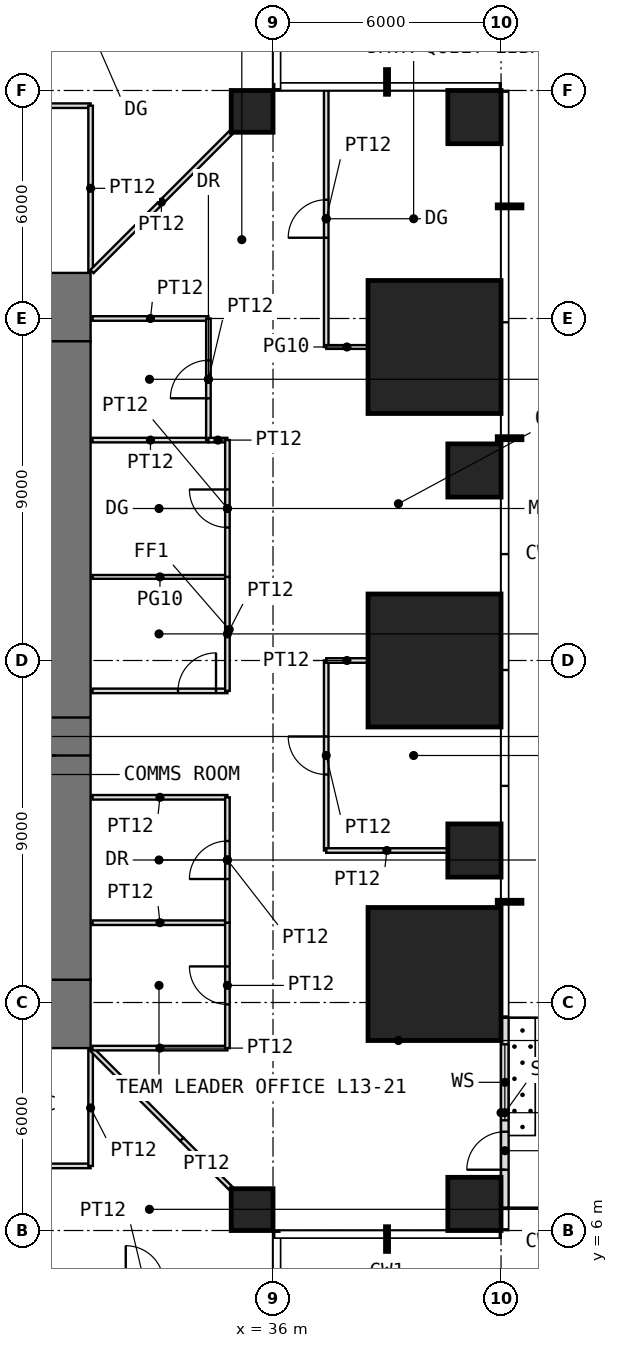
"""IFC4 building model, lengths in metres.
Left out: names, types, materials, properties, quantities, classifications, styles, units other than length and angle.
Written with IfcOpenShell. Run it as: python <this file> out.ifc"""

import sys

from ifc_helpers import new_model, si_unit, direction, frame, frame_2d, origin, origin_2d, place, context, subcontext, project, spatial, rectangle, extrude, element, fill, save


model = new_model("IFC4")
c1 = context("Model", 3, precision=1e-05, world=origin(), true_north=direction((0.0, 1.0)))
c2 = subcontext(c1, "Body", "Model", "MODEL_VIEW")
j1 = project(units=[si_unit("LENGTHUNIT", "METRE"), si_unit("PLANEANGLEUNIT", "RADIAN")], contexts=[c1])
p1 = place(None, origin())
s1 = spatial("IfcSite", under=j1, at=p1, CompositionType="ELEMENT")
p2 = place(p1, origin())
s2 = spatial("IfcBuilding", under=s1, at=p2, CompositionType="ELEMENT")
p3 = place(p2, frame((0.0, 0.0, 58.5)))
s3 = spatial("IfcBuildingStorey", under=s2, at=p3, CompositionType="ELEMENT", Elevation=58.5)
p4 = place(p3, frame((35.45, 6.55, 0.0), z_axis=(0.0, 0.0, 1.0), x_axis=(1.0, 0.0, 0.0)))
e1 = element("IfcColumn", 1, at=p4, inside=s3, PredefinedType="COLUMN", context=c2, shape_type="SweptSolid", body=[
    extrude(rectangle(XDim=1.1, YDim=1.1, at=origin_2d()), origin(), (0.0, 0.0, 1.0), 4.0),
])
p5 = place(p3, frame((41.3, 6.7, 0.0), z_axis=(0.0, 0.0, 1.0), x_axis=(1.0, 0.0, 0.0)))
e2 = element("IfcColumn", 2, at=p5, inside=s3, PredefinedType="COLUMN", context=c2, shape_type="SweptSolid", body=[
    extrude(rectangle(XDim=1.4, YDim=1.4, at=origin_2d()), origin(), (0.0, 0.0, 1.0), 4.0),
])
p6 = place(p3, frame((40.25, 12.75, 0.0), z_axis=(0.0, 0.0, 1.0), x_axis=(1.0, 0.0, 0.0)))
e3 = element("IfcColumn", 3, at=p6, inside=s3, PredefinedType="COLUMN", context=c2, shape_type="SweptSolid", body=[
    extrude(rectangle(XDim=3.5, YDim=3.5, at=origin_2d()), origin(), (0.0, 0.0, 1.0), 4.0),
])
p7 = place(p3, frame((41.3, 16.0, 0.0), z_axis=(0.0, 0.0, 1.0), x_axis=(1.0, 0.0, 0.0)))
e4 = element("IfcColumn", 4, at=p7, inside=s3, PredefinedType="COLUMN", context=c2, shape_type="SweptSolid", body=[
    extrude(rectangle(XDim=1.4, YDim=1.4, at=origin_2d()), origin(), (0.0, 0.0, 1.0), 4.0),
])
p8 = place(p3, frame((40.25, 21.0, 0.0), z_axis=(0.0, 0.0, 1.0), x_axis=(1.0, 0.0, 0.0)))
e5 = element("IfcColumn", 5, at=p8, inside=s3, PredefinedType="COLUMN", context=c2, shape_type="SweptSolid", body=[
    extrude(rectangle(XDim=3.5, YDim=3.5, at=origin_2d()), origin(), (0.0, 0.0, 1.0), 4.0),
])
p9 = place(p3, frame((41.3, 26.0, 0.0), z_axis=(0.0, 0.0, 1.0), x_axis=(1.0, 0.0, 0.0)))
e6 = element("IfcColumn", 6, at=p9, inside=s3, PredefinedType="COLUMN", context=c2, shape_type="SweptSolid", body=[
    extrude(rectangle(XDim=1.4, YDim=1.4, at=origin_2d()), origin(), (0.0, 0.0, 1.0), 4.0),
])
p10 = place(p3, frame((40.25, 29.25, 0.0), z_axis=(0.0, 0.0, 1.0), x_axis=(1.0, 0.0, 0.0)))
e7 = element("IfcColumn", 7, at=p10, inside=s3, PredefinedType="COLUMN", context=c2, shape_type="SweptSolid", body=[
    extrude(rectangle(XDim=3.5, YDim=3.5, at=origin_2d()), origin(), (0.0, 0.0, 1.0), 4.0),
])
p11 = place(p3, frame((35.45, 35.45, 0.0), z_axis=(0.0, 0.0, 1.0), x_axis=(1.0, 0.0, 0.0)))
e8 = element("IfcColumn", 8, at=p11, inside=s3, PredefinedType="COLUMN", context=c2, shape_type="SweptSolid", body=[
    extrude(rectangle(XDim=1.1, YDim=1.1, at=origin_2d()), origin(), (0.0, 0.0, 1.0), 4.0),
])
p12 = place(p3, frame((41.3, 35.3, 0.0), z_axis=(0.0, 0.0, 1.0), x_axis=(1.0, 0.0, 0.0)))
e9 = element("IfcColumn", 9, at=p12, inside=s3, PredefinedType="COLUMN", context=c2, shape_type="SweptSolid", body=[
    extrude(rectangle(XDim=1.4, YDim=1.4, at=origin_2d()), origin(), (0.0, 0.0, 1.0), 4.0),
])
p13 = place(p3, frame((42.1, 6.6, 0.0), z_axis=(0.0, 0.0, 1.0), x_axis=(0.0, 1.0, 0.0)))
e10 = element("IfcWall", 10, at=p13, inside=s3, PredefinedType="USERDEFINED", context=c2, shape_type="SweptSolid", body=[
    extrude(rectangle(XDim=5.0, YDim=0.2, at=frame_2d((2.5, 0.0))), origin(), (0.0, 0.0, 1.0), 3.75),
])
p14 = place(p13, frame((1.0, 0.0, 0.0)))
e11 = element("IfcOpeningElement", 11, at=p14, cuts=e10, PredefinedType="OPENING", context=c2, shape_type="SweptSolid", body=[
    extrude(rectangle(XDim=1.0, YDim=2.4, at=frame_2d((0.5, 1.2))), frame((0.0, 0.11, 0.0), z_axis=(0.0, -1.0, 0.0), x_axis=(1.0, 0.0, 0.0)), (0.0, 0.0, 1.0), 0.22),
])
p15 = place(p13, frame((2.3, 0.0, 0.3)))
e12 = element("IfcOpeningElement", 12, at=p15, cuts=e10, PredefinedType="OPENING", context=c2, shape_type="SweptSolid", body=[
    extrude(rectangle(XDim=2.0, YDim=2.7, at=frame_2d((1.0, 1.35))), frame((0.0, 0.11, 0.0), z_axis=(0.0, -1.0, 0.0), x_axis=(1.0, 0.0, 0.0)), (0.0, 0.0, 1.0), 0.22),
])
p16 = place(p3, frame((10.8, 11.7, -0.05), z_axis=(0.0, 0.0, 1.0), x_axis=(1.0, 0.0, 0.0)))
e13 = element("IfcWall", 13, at=p16, inside=s3, PredefinedType="SHEAR", context=c2, shape_type="SweptSolid", body=[
    extrude(rectangle(XDim=20.4, YDim=1.8, at=frame_2d((10.2, 0.0))), origin(), (0.0, 0.0, 1.0), 4.0),
])
p17 = place(p16, frame((9.2, 0.0, 0.05)))
e14 = element("IfcOpeningElement", 14, at=p17, cuts=e13, PredefinedType="OPENING", context=c2, shape_type="SweptSolid", body=[
    extrude(rectangle(XDim=2.0, YDim=2.2, at=frame_2d((1.0, 1.1))), frame((0.0, 0.91, 0.0), z_axis=(0.0, -1.0, 0.0), x_axis=(1.0, 0.0, 0.0)), (0.0, 0.0, 1.0), 1.82),
])
p18 = place(p3, frame((10.8, 30.3, -0.05), z_axis=(0.0, 0.0, 1.0), x_axis=(1.0, 0.0, 0.0)))
e15 = element("IfcWall", 15, at=p18, inside=s3, PredefinedType="SHEAR", context=c2, shape_type="SweptSolid", body=[
    extrude(rectangle(XDim=20.4, YDim=1.8, at=frame_2d((10.2, 0.0))), origin(), (0.0, 0.0, 1.0), 4.0),
])
p19 = place(p18, frame((9.2, 0.0, 0.05)))
e16 = element("IfcOpeningElement", 16, at=p19, cuts=e15, PredefinedType="OPENING", context=c2, shape_type="SweptSolid", body=[
    extrude(rectangle(XDim=2.0, YDim=2.2, at=frame_2d((1.0, 1.1))), frame((0.0, 0.91, 0.0), z_axis=(0.0, -1.0, 0.0), x_axis=(1.0, 0.0, 0.0)), (0.0, 0.0, 1.0), 1.82),
])
p20 = place(p3, frame((30.3, 12.6, -0.05), z_axis=(0.0, 0.0, 1.0), x_axis=(0.0, 1.0, 0.0)))
e17 = element("IfcWall", 17, at=p20, inside=s3, PredefinedType="SHEAR", context=c2, shape_type="SweptSolid", body=[
    extrude(rectangle(XDim=16.8, YDim=1.8, at=frame_2d((8.4, 0.0))), origin(), (0.0, 0.0, 1.0), 4.0),
])
p21 = place(p20, frame((5.9, 0.0, 0.05)))
e18 = element("IfcOpeningElement", 18, at=p21, cuts=e17, PredefinedType="OPENING", context=c2, shape_type="SweptSolid", body=[
    extrude(rectangle(XDim=1.0, YDim=2.2, at=frame_2d((0.5, 1.1))), frame((0.0, 0.91, 0.0), z_axis=(0.0, -1.0, 0.0), x_axis=(1.0, 0.0, 0.0)), (0.0, 0.0, 1.0), 1.82),
])
p22 = place(p3, frame((23.6, 35.6, 0.0), z_axis=(0.0, 0.0, 1.0), x_axis=(1.0, 0.0, 0.0)))
e19 = element("IfcWall", 19, at=p22, inside=s3, PredefinedType="PARTITIONING", context=c2, shape_type="SweptSolid", body=[
    extrude(rectangle(XDim=7.6, YDim=0.12, at=frame_2d((3.8, 0.0))), origin(), (0.0, 0.0, 1.0), 3.75),
])
p23 = place(p22, frame((3.3, 0.0, 0.0)))
e20 = element("IfcOpeningElement", 20, at=p23, cuts=e19, PredefinedType="OPENING", context=c2, shape_type="SweptSolid", body=[
    extrude(rectangle(XDim=1.0, YDim=2.4, at=frame_2d((0.5, 1.2))), frame((0.0, 0.07, 0.0), z_axis=(0.0, -1.0, 0.0), x_axis=(1.0, 0.0, 0.0)), (0.0, 0.0, 1.0), 0.14),
])
p24 = place(p3, frame((27.6, 7.7, 0.0), z_axis=(0.0, 0.0, 1.0), x_axis=(1.0, 0.0, 0.0)))
e21 = element("IfcWall", 21, at=p24, inside=s3, PredefinedType="PARTITIONING", context=c2, shape_type="SweptSolid", body=[
    extrude(rectangle(XDim=3.6, YDim=0.12, at=frame_2d((1.8, 0.0))), origin(), (0.0, 0.0, 1.0), 3.75),
])
p25 = place(p24, frame((1.3, 0.0, 0.0)))
e22 = element("IfcOpeningElement", 22, at=p25, cuts=e21, PredefinedType="OPENING", context=c2, shape_type="SweptSolid", body=[
    extrude(rectangle(XDim=1.0, YDim=2.2, at=frame_2d((0.5, 1.1))), frame((0.0, 0.07, 0.0), z_axis=(0.0, -1.0, 0.0), x_axis=(1.0, 0.0, 0.0)), (0.0, 0.0, 1.0), 0.14),
])
p26 = place(p3, frame((31.2, 7.7, 0.0), z_axis=(0.0, 0.0, 1.0), x_axis=(0.0, 1.0, 0.0)))
e23 = element("IfcWall", 23, at=p26, inside=s3, PredefinedType="PARTITIONING", context=c2, shape_type="SweptSolid", body=[
    extrude(rectangle(XDim=3.05, YDim=0.12, at=frame_2d((1.525, 0.0))), origin(), (0.0, 0.0, 1.0), 3.75),
])
p27 = place(p3, frame((31.2, 31.25, 0.0), z_axis=(0.0, 0.0, 1.0), x_axis=(0.0, 1.0, 0.0)))
e24 = element("IfcWall", 24, at=p27, inside=s3, PredefinedType="PARTITIONING", context=c2, shape_type="SweptSolid", body=[
    extrude(rectangle(XDim=4.35, YDim=0.12, at=frame_2d((2.175, 0.0))), origin(), (0.0, 0.0, 1.0), 3.75),
])
p28 = place(p3, frame((31.235, 10.765, 0.0), z_axis=(0.0, 0.0, 1.0), x_axis=(0.707106781187, -0.707106781187, 0.0)))
e25 = element("IfcWall", 25, at=p28, inside=s3, PredefinedType="PARTITIONING", context=c2, shape_type="SweptSolid", body=[
    extrude(rectangle(XDim=3.346, YDim=0.12, at=frame_2d((1.673, 0.0))), origin(), (0.0, 0.0, 1.0), 3.75),
])
p29 = place(p3, frame((31.235, 31.235, 0.0), z_axis=(0.0, 0.0, 1.0), x_axis=(0.707106781187, 0.707106781187, 0.0)))
e26 = element("IfcWall", 26, at=p29, inside=s3, PredefinedType="PARTITIONING", context=c2, shape_type="SweptSolid", body=[
    extrude(rectangle(XDim=5.168, YDim=0.12, at=frame_2d((2.584, 0.0))), origin(), (0.0, 0.0, 1.0), 3.75),
])
for number, where, z_axis, x_axis in (
    (27, (31.25, 10.8, 0.0), (0.0, 0.0, 1.0), (1.0, 0.0, 0.0)),
    (28, (31.25, 14.1, 0.0), (0.0, 0.0, 1.0), (1.0, 0.0, 0.0)),
    (29, (31.25, 17.4, 0.0), (0.0, 0.0, 1.0), (1.0, 0.0, 0.0)),
):
    element("IfcWall", number, at=place(p3, frame(where, z_axis=z_axis, x_axis=x_axis)), inside=s3, PredefinedType="PARTITIONING", context=c2, shape_type="SweptSolid", body=[
        extrude(rectangle(XDim=3.55, YDim=0.12, at=frame_2d((1.775, 0.0))), origin(), (0.0, 0.0, 1.0), 3.75),
    ])
p30 = place(p3, frame((31.25, 20.2, 0.0), z_axis=(0.0, 0.0, 1.0), x_axis=(1.0, 0.0, 0.0)))
e30 = element("IfcWall", 30, at=p30, inside=s3, PredefinedType="PARTITIONING", context=c2, shape_type="SweptSolid", body=[
    extrude(rectangle(XDim=3.55, YDim=0.12, at=frame_2d((1.775, 0.0))), origin(), (0.0, 0.0, 1.0), 3.75),
])
p31 = place(p30, frame((2.25, 0.0, 0.0)))
e31 = element("IfcOpeningElement", 31, at=p31, cuts=e30, PredefinedType="OPENING", context=c2, shape_type="SweptSolid", body=[
    extrude(rectangle(XDim=1.0, YDim=2.4, at=frame_2d((0.5, 1.2))), frame((0.0, 0.07, 0.0), z_axis=(0.0, -1.0, 0.0), x_axis=(1.0, 0.0, 0.0)), (0.0, 0.0, 1.0), 0.14),
])
p32 = place(p3, frame((31.25, 23.2, 0.0), z_axis=(0.0, 0.0, 1.0), x_axis=(1.0, 0.0, 0.0)))
e32 = element("IfcWall", 32, at=p32, inside=s3, PredefinedType="PARTITIONING", context=c2, shape_type="SweptSolid", body=[
    extrude(rectangle(XDim=3.55, YDim=0.1, at=frame_2d((1.775, 0.0))), origin(), (0.0, 0.0, 1.0), 3.75),
])
for number, where, z_axis, x_axis in (
    (33, (31.25, 26.8, 0.0), (0.0, 0.0, 1.0), (1.0, 0.0, 0.0)),
    (34, (31.25, 30.0, 0.0), (0.0, 0.0, 1.0), (1.0, 0.0, 0.0)),
):
    element("IfcWall", number, at=place(p3, frame(where, z_axis=z_axis, x_axis=x_axis)), inside=s3, PredefinedType="PARTITIONING", context=c2, shape_type="SweptSolid", body=[
        extrude(rectangle(XDim=3.05, YDim=0.12, at=frame_2d((1.525, 0.0))), origin(), (0.0, 0.0, 1.0), 3.75),
    ])
p33 = place(p3, frame((33.602, 8.398, 0.0), z_axis=(0.0, 0.0, 1.0), x_axis=(0.707106781187, -0.707106781187, 0.0)))
e35 = element("IfcWall", 35, at=p33, inside=s3, PredefinedType="PARTITIONING", context=c2, shape_type="SweptSolid", body=[
    extrude(rectangle(XDim=1.822, YDim=0.12, at=frame_2d((0.911, 0.0))), origin(), (0.0, 0.0, 1.0), 3.75),
])
p34 = place(p3, frame((34.3, 26.8, 0.0), z_axis=(0.0, 0.0, 1.0), x_axis=(0.0, 1.0, 0.0)))
e36 = element("IfcWall", 36, at=p34, inside=s3, PredefinedType="PARTITIONING", context=c2, shape_type="SweptSolid", body=[
    extrude(rectangle(XDim=3.2, YDim=0.12, at=frame_2d((1.6, 0.0))), origin(), (0.0, 0.0, 1.0), 3.75),
])
p35 = place(p34, frame((1.1, 0.0, 0.0)))
e37 = element("IfcOpeningElement", 37, at=p35, cuts=e36, PredefinedType="OPENING", context=c2, shape_type="SweptSolid", body=[
    extrude(rectangle(XDim=1.0, YDim=2.2, at=frame_2d((0.5, 1.1))), frame((0.0, 0.07, 0.0), z_axis=(0.0, -1.0, 0.0), x_axis=(1.0, 0.0, 0.0)), (0.0, 0.0, 1.0), 0.14),
])
p36 = place(p3, frame((34.3, 26.8, 0.0), z_axis=(0.0, 0.0, 1.0), x_axis=(1.0, 0.0, 0.0)))
e38 = element("IfcWall", 38, at=p36, inside=s3, PredefinedType="PARTITIONING", context=c2, shape_type="SweptSolid", body=[
    extrude(rectangle(XDim=0.5, YDim=0.12, at=frame_2d((0.25, 0.0))), origin(), (0.0, 0.0, 1.0), 3.75),
])
p37 = place(p3, frame((34.8, 10.8, 0.0), z_axis=(0.0, 0.0, 1.0), x_axis=(0.0, 1.0, 0.0)))
e39 = element("IfcWall", 39, at=p37, inside=s3, PredefinedType="PARTITIONING", context=c2, shape_type="SweptSolid", body=[
    extrude(rectangle(XDim=3.3, YDim=0.12, at=frame_2d((1.65, 0.0))), origin(), (0.0, 0.0, 1.0), 3.75),
])
p38 = place(p37, frame((1.15, 0.0, 0.0)))
e40 = element("IfcOpeningElement", 40, at=p38, cuts=e39, PredefinedType="OPENING", context=c2, shape_type="SweptSolid", body=[
    extrude(rectangle(XDim=1.0, YDim=2.2, at=frame_2d((0.5, 1.1))), frame((0.0, 0.07, 0.0), z_axis=(0.0, -1.0, 0.0), x_axis=(1.0, 0.0, 0.0)), (0.0, 0.0, 1.0), 0.14),
])
p39 = place(p3, frame((34.8, 14.1, 0.0), z_axis=(0.0, 0.0, 1.0), x_axis=(0.0, 1.0, 0.0)))
e41 = element("IfcWall", 41, at=p39, inside=s3, PredefinedType="PARTITIONING", context=c2, shape_type="SweptSolid", body=[
    extrude(rectangle(XDim=3.3, YDim=0.12, at=frame_2d((1.65, 0.0))), origin(), (0.0, 0.0, 1.0), 3.75),
])
p40 = place(p39, frame((1.15, 0.0, 0.0)))
e42 = element("IfcOpeningElement", 42, at=p40, cuts=e41, PredefinedType="OPENING", context=c2, shape_type="SweptSolid", body=[
    extrude(rectangle(XDim=1.0, YDim=2.2, at=frame_2d((0.5, 1.1))), frame((0.0, 0.07, 0.0), z_axis=(0.0, -1.0, 0.0), x_axis=(1.0, 0.0, 0.0)), (0.0, 0.0, 1.0), 0.14),
])
p41 = place(p3, frame((34.8, 20.2, 0.0), z_axis=(0.0, 0.0, 1.0), x_axis=(0.0, 1.0, 0.0)))
e43 = element("IfcWall", 43, at=p41, inside=s3, PredefinedType="PARTITIONING", context=c2, shape_type="SweptSolid", body=[
    extrude(rectangle(XDim=3.0, YDim=0.12, at=frame_2d((1.5, 0.0))), origin(), (0.0, 0.0, 1.0), 3.75),
])
p42 = place(p3, frame((34.8, 23.2, 0.0), z_axis=(0.0, 0.0, 1.0), x_axis=(0.0, 1.0, 0.0)))
e44 = element("IfcWall", 44, at=p42, inside=s3, PredefinedType="PARTITIONING", context=c2, shape_type="SweptSolid", body=[
    extrude(rectangle(XDim=3.6, YDim=0.12, at=frame_2d((1.8, 0.0))), origin(), (0.0, 0.0, 1.0), 3.75),
])
p43 = place(p42, frame((1.3, 0.0, 0.0)))
e45 = element("IfcOpeningElement", 45, at=p43, cuts=e44, PredefinedType="OPENING", context=c2, shape_type="SweptSolid", body=[
    extrude(rectangle(XDim=1.0, YDim=2.4, at=frame_2d((0.5, 1.2))), frame((0.0, 0.07, 0.0), z_axis=(0.0, -1.0, 0.0), x_axis=(1.0, 0.0, 0.0)), (0.0, 0.0, 1.0), 0.14),
])
p44 = place(p3, frame((37.4, 16.0, 0.0), z_axis=(0.0, 0.0, 1.0), x_axis=(0.0, 1.0, 0.0)))
e46 = element("IfcWall", 46, at=p44, inside=s3, PredefinedType="PARTITIONING", context=c2, shape_type="SweptSolid", body=[
    extrude(rectangle(XDim=5.0, YDim=0.12, at=frame_2d((2.5, 0.0))), origin(), (0.0, 0.0, 1.0), 3.75),
])
p45 = place(p44, frame((2.0, 0.0, 0.0)))
e47 = element("IfcOpeningElement", 47, at=p45, cuts=e46, PredefinedType="OPENING", context=c2, shape_type="SweptSolid", body=[
    extrude(rectangle(XDim=1.0, YDim=2.2, at=frame_2d((0.5, 1.1))), frame((0.0, 0.07, 0.0), z_axis=(0.0, -1.0, 0.0), x_axis=(1.0, 0.0, 0.0)), (0.0, 0.0, 1.0), 0.14),
])
p46 = place(p3, frame((37.4, 16.0, 0.0), z_axis=(0.0, 0.0, 1.0), x_axis=(1.0, 0.0, 0.0)))
e48 = element("IfcWall", 48, at=p46, inside=s3, PredefinedType="PARTITIONING", context=c2, shape_type="SweptSolid", body=[
    extrude(rectangle(XDim=3.19, YDim=0.12, at=frame_2d((1.595, 0.0))), origin(), (0.0, 0.0, 1.0), 3.75),
])
p47 = place(p3, frame((37.4, 21.0, 0.0), z_axis=(0.0, 0.0, 1.0), x_axis=(1.0, 0.0, 0.0)))
e49 = element("IfcWall", 49, at=p47, inside=s3, PredefinedType="PARTITIONING", context=c2, shape_type="SweptSolid", body=[
    extrude(rectangle(XDim=1.09, YDim=0.12, at=frame_2d((0.545, 0.0))), origin(), (0.0, 0.0, 1.0), 3.75),
])
p48 = place(p3, frame((37.4, 29.25, 0.0), z_axis=(0.0, 0.0, 1.0), x_axis=(0.0, 1.0, 0.0)))
e50 = element("IfcWall", 50, at=p48, inside=s3, PredefinedType="PARTITIONING", context=c2, shape_type="SweptSolid", body=[
    extrude(rectangle(XDim=6.75, YDim=0.12, at=frame_2d((3.375, 0.0))), origin(), (0.0, 0.0, 1.0), 3.75),
])
p49 = place(p48, frame((2.875, 0.0, 0.0)))
e51 = element("IfcOpeningElement", 51, at=p49, cuts=e50, PredefinedType="OPENING", context=c2, shape_type="SweptSolid", body=[
    extrude(rectangle(XDim=1.0, YDim=2.4, at=frame_2d((0.5, 1.2))), frame((0.0, 0.07, 0.0), z_axis=(0.0, -1.0, 0.0), x_axis=(1.0, 0.0, 0.0)), (0.0, 0.0, 1.0), 0.14),
])
p50 = place(p3, frame((37.4, 29.25, 0.0), z_axis=(0.0, 0.0, 1.0), x_axis=(1.0, 0.0, 0.0)))
e52 = element("IfcWall", 52, at=p50, inside=s3, PredefinedType="PARTITIONING", context=c2, shape_type="SweptSolid", body=[
    extrude(rectangle(XDim=1.09, YDim=0.1, at=frame_2d((0.545, 0.0))), origin(), (0.0, 0.0, 1.0), 3.75),
])
p51 = place(p14, origin())
e53 = element("IfcDoor", 53, at=p51, inside=s3, OperationType="SINGLE_SWING_LEFT", PredefinedType="DOOR", context=c2, shape_type="SweptSolid", body=[
    extrude(rectangle(XDim=1.0, YDim=2.4, at=frame_2d((0.5, 1.2))), frame((0.0, 0.025, 0.0), z_axis=(0.0, -1.0, 0.0), x_axis=(1.0, 0.0, 0.0)), (0.0, 0.0, 1.0), 0.05),
])
fill(e11, e53)
p52 = place(p15, origin())
e54 = element("IfcWindow", 54, at=p52, inside=s3, PartitioningType="SINGLE_PANEL", PredefinedType="WINDOW", context=c2, shape_type="SweptSolid", body=[
    extrude(rectangle(XDim=2.0, YDim=2.7, at=frame_2d((1.0, 1.35))), frame((0.0, 0.03, 0.0), z_axis=(0.0, -1.0, 0.0), x_axis=(1.0, 0.0, 0.0)), (0.0, 0.0, 1.0), 0.06),
])
fill(e12, e54)
p53 = place(p21, origin())
e55 = element("IfcDoor", 55, at=p53, inside=s3, OperationType="SINGLE_SWING_LEFT", PredefinedType="DOOR", context=c2, shape_type="SweptSolid", body=[
    extrude(rectangle(XDim=1.0, YDim=2.2, at=frame_2d((0.5, 1.1))), frame((0.0, 0.025, 0.0), z_axis=(0.0, -1.0, 0.0), x_axis=(1.0, 0.0, 0.0)), (0.0, 0.0, 1.0), 0.05),
])
fill(e18, e55)
p54 = place(p38, origin())
e56 = element("IfcDoor", 56, at=p54, inside=s3, OperationType="SINGLE_SWING_RIGHT", PredefinedType="DOOR", context=c2, shape_type="SweptSolid", body=[
    extrude(rectangle(XDim=1.0, YDim=2.2, at=frame_2d((0.5, 1.1))), frame((0.0, 0.025, 0.0), z_axis=(0.0, -1.0, 0.0), x_axis=(1.0, 0.0, 0.0)), (0.0, 0.0, 1.0), 0.05),
])
fill(e40, e56)
p55 = place(p40, origin())
e57 = element("IfcDoor", 57, at=p55, inside=s3, OperationType="SINGLE_SWING_LEFT", PredefinedType="DOOR", context=c2, shape_type="SweptSolid", body=[
    extrude(rectangle(XDim=1.0, YDim=2.2, at=frame_2d((0.5, 1.1))), frame((0.0, 0.025, 0.0), z_axis=(0.0, -1.0, 0.0), x_axis=(1.0, 0.0, 0.0)), (0.0, 0.0, 1.0), 0.05),
])
fill(e42, e57)
p56 = place(p43, origin())
e58 = element("IfcDoor", 58, at=p56, inside=s3, OperationType="SINGLE_SWING_RIGHT", PredefinedType="DOOR", context=c2, shape_type="SweptSolid", body=[
    extrude(rectangle(XDim=1.0, YDim=2.4, at=frame_2d((0.5, 1.2))), frame((0.0, 0.025, 0.0), z_axis=(0.0, -1.0, 0.0), x_axis=(1.0, 0.0, 0.0)), (0.0, 0.0, 1.0), 0.05),
])
fill(e45, e58)
p57 = place(p35, origin())
e59 = element("IfcDoor", 59, at=p57, inside=s3, OperationType="SINGLE_SWING_LEFT", PredefinedType="DOOR", context=c2, shape_type="SweptSolid", body=[
    extrude(rectangle(XDim=1.0, YDim=2.2, at=frame_2d((0.5, 1.1))), frame((0.0, 0.025, 0.0), z_axis=(0.0, -1.0, 0.0), x_axis=(1.0, 0.0, 0.0)), (0.0, 0.0, 1.0), 0.05),
])
fill(e37, e59)
p58 = place(p45, origin())
e60 = element("IfcDoor", 60, at=p58, inside=s3, OperationType="SINGLE_SWING_RIGHT", PredefinedType="DOOR", context=c2, shape_type="SweptSolid", body=[
    extrude(rectangle(XDim=1.0, YDim=2.2, at=frame_2d((0.5, 1.1))), frame((0.0, 0.025, 0.0), z_axis=(0.0, -1.0, 0.0), x_axis=(1.0, 0.0, 0.0)), (0.0, 0.0, 1.0), 0.05),
])
fill(e47, e60)
p59 = place(p49, origin())
e61 = element("IfcDoor", 61, at=p59, inside=s3, OperationType="SINGLE_SWING_LEFT", PredefinedType="DOOR", context=c2, shape_type="SweptSolid", body=[
    extrude(rectangle(XDim=1.0, YDim=2.4, at=frame_2d((0.5, 1.2))), frame((0.0, 0.025, 0.0), z_axis=(0.0, -1.0, 0.0), x_axis=(1.0, 0.0, 0.0)), (0.0, 0.0, 1.0), 0.05),
])
fill(e51, e61)
p60 = place(p31, origin())
e62 = element("IfcDoor", 62, at=p60, inside=s3, OperationType="SINGLE_SWING_RIGHT", PredefinedType="DOOR", context=c2, shape_type="SweptSolid", body=[
    extrude(rectangle(XDim=1.0, YDim=2.4, at=frame_2d((0.5, 1.2))), frame((0.0, 0.025, 0.0), z_axis=(0.0, -1.0, 0.0), x_axis=(1.0, 0.0, 0.0)), (0.0, 0.0, 1.0), 0.05),
])
fill(e31, e62)
save(model, sys.argv[1])
